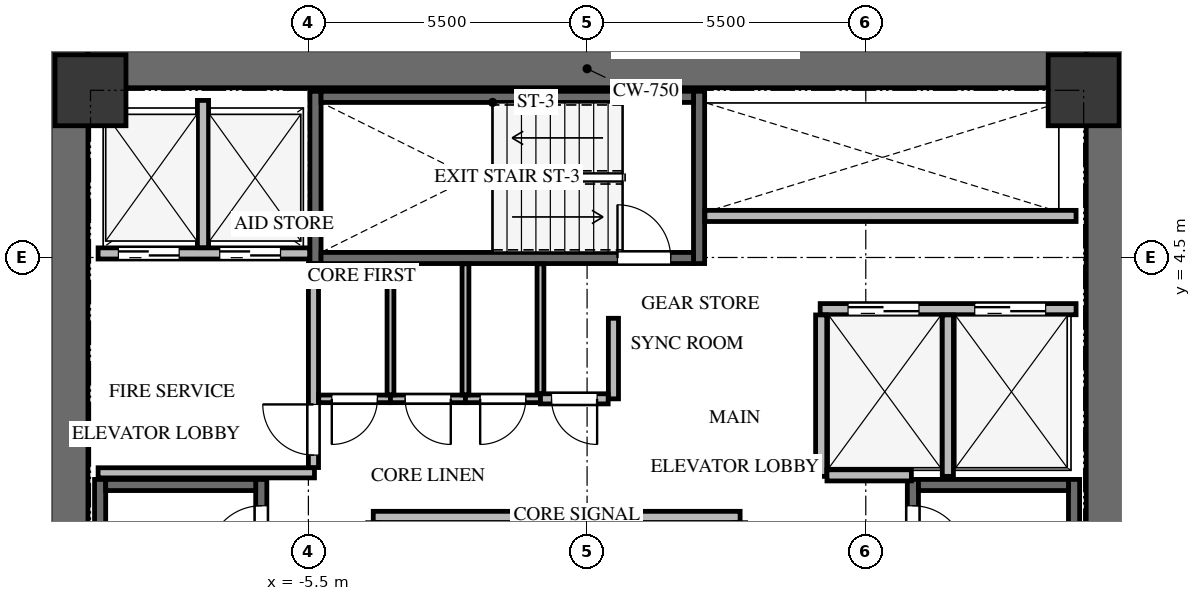
"""IFC4 building model, lengths in metres.
Left out: names, types, materials, properties, quantities, classifications, styles, units other than length and angle.
Written with IfcOpenShell. Run it as: python <this file> out.ifc"""

import sys

from ifc_helpers import new_model, si_unit, direction, frame, frame_2d, origin, origin_2d, place, context, subcontext, project, spatial, rectangle, extrude, source, transform, mapped, element, fill, save


model = new_model("IFC4")
c1 = context("Model", 3, precision=1e-05, world=origin(), true_north=direction((0.0, 1.0)))
c2 = subcontext(c1, "Body", "Model", "MODEL_VIEW")
j1 = project(units=[si_unit("LENGTHUNIT", "METRE"), si_unit("PLANEANGLEUNIT", "RADIAN")], contexts=[c1])
p1 = place(None, origin())
s1 = spatial("IfcSite", under=j1, at=p1, CompositionType="ELEMENT")
p2 = place(p1, origin())
s2 = spatial("IfcBuilding", under=s1, at=p2, CompositionType="ELEMENT")
p3 = place(p2, frame((0.0, 0.0, 97.5)))
s3 = spatial("IfcBuildingStorey", under=s2, at=p3, CompositionType="ELEMENT", Elevation=97.5)
for number, where, z_axis, x_axis in (
    (1, (-10.225, -8.6, 0.0), (0.0, 0.0, 1.0), (0.0, 1.0, 0.0)),
    (2, (10.225, -8.6, 0.0), (0.0, 0.0, 1.0), (0.0, 1.0, 0.0)),
):
    element("IfcWall", number, at=place(p3, frame(where, z_axis=z_axis, x_axis=x_axis)), inside=s3, PredefinedType="SHEAR", context=c2, shape_type="SweptSolid", body=[
        extrude(rectangle(XDim=17.2, YDim=0.75, at=frame_2d((8.6, 0.0))), origin(), (0.0, 0.0, 1.0), 3.3),
    ])
p4 = place(p3, frame((-9.85, 8.225, 0.0), z_axis=(0.0, 0.0, 1.0), x_axis=(1.0, 0.0, 0.0)))
e3 = element("IfcWall", 3, at=p4, inside=s3, PredefinedType="SHEAR", context=c2, shape_type="SweptSolid", body=[
    extrude(rectangle(XDim=19.7, YDim=0.75, at=frame_2d((9.85, 0.0))), origin(), (0.0, 0.0, 1.0), 3.3),
])
p5 = place(p3, frame((-6.43, -7.77, -0.24), z_axis=(0.0, 0.0, 1.0), x_axis=(0.0, 1.0, 0.0)))
e4 = element("IfcWall", 4, at=p5, inside=s3, PredefinedType="SHEAR", context=c2, shape_type="SweptSolid", body=[
    extrude(rectangle(XDim=7.89, YDim=0.22, at=frame_2d((3.945, 0.0))), origin(), (0.0, 0.0, 1.0), 3.3),
])
p6 = place(p5, frame((6.32, 0.0, 0.0)))
e5 = element("IfcOpeningElement", 5, at=p6, cuts=e4, PredefinedType="OPENING", context=c2, shape_type="SweptSolid", body=[
    extrude(rectangle(XDim=1.05, YDim=2.15, at=frame_2d((0.525, 1.075))), frame((0.0, 0.12, 0.0), z_axis=(0.0, -1.0, 0.0), x_axis=(1.0, 0.0, 0.0)), (0.0, 0.0, 1.0), 0.24),
])
p7 = place(p3, frame((-9.61, 0.12, -0.24), z_axis=(0.0, 0.0, 1.0), x_axis=(0.0, -1.0, 0.0)))
e6 = element("IfcWall", 6, at=p7, inside=s3, PredefinedType="SHEAR", context=c2, shape_type="SweptSolid", body=[
    extrude(rectangle(XDim=7.89, YDim=0.22, at=frame_2d((3.945, 0.0))), origin(), (0.0, 0.0, 1.0), 3.3),
])
p8 = place(p3, frame((-6.54, 0.01, -0.24), z_axis=(0.0, 0.0, 1.0), x_axis=(-1.0, 0.0, 0.0)))
e7 = element("IfcWall", 7, at=p8, inside=s3, PredefinedType="SHEAR", context=c2, shape_type="SweptSolid", body=[
    extrude(rectangle(XDim=2.96, YDim=0.22, at=frame_2d((1.48, 0.0))), origin(), (0.0, 0.0, 1.0), 3.3),
])
p9 = place(p3, frame((9.61, -7.77, -0.24), z_axis=(0.0, 0.0, 1.0), x_axis=(0.0, 1.0, 0.0)))
e8 = element("IfcWall", 8, at=p9, inside=s3, PredefinedType="SHEAR", context=c2, shape_type="SweptSolid", body=[
    extrude(rectangle(XDim=7.89, YDim=0.22, at=frame_2d((3.945, 0.0))), origin(), (0.0, 0.0, 1.0), 3.3),
])
p10 = place(p3, frame((6.43, 0.12, -0.24), z_axis=(0.0, 0.0, 1.0), x_axis=(0.0, -1.0, 0.0)))
e9 = element("IfcWall", 9, at=p10, inside=s3, PredefinedType="SHEAR", context=c2, shape_type="SweptSolid", body=[
    extrude(rectangle(XDim=7.89, YDim=0.22, at=frame_2d((3.945, 0.0))), origin(), (0.0, 0.0, 1.0), 3.3),
])
p11 = place(p10, frame((0.52, 0.0, 0.0)))
e10 = element("IfcOpeningElement", 10, at=p11, cuts=e9, PredefinedType="OPENING", context=c2, shape_type="SweptSolid", body=[
    extrude(rectangle(XDim=1.05, YDim=2.15, at=frame_2d((0.525, 1.075))), frame((0.0, 0.12, 0.0), z_axis=(0.0, -1.0, 0.0), x_axis=(1.0, 0.0, 0.0)), (0.0, 0.0, 1.0), 0.24),
])
p12 = place(p3, frame((9.5, 0.01, -0.24), z_axis=(0.0, 0.0, 1.0), x_axis=(-1.0, 0.0, 0.0)))
e11 = element("IfcWall", 11, at=p12, inside=s3, PredefinedType="SHEAR", context=c2, shape_type="SweptSolid", body=[
    extrude(rectangle(XDim=2.96, YDim=0.22, at=frame_2d((1.48, 0.0))), origin(), (0.0, 0.0, 1.0), 3.3),
])
for number, where, z_axis, x_axis in (
    (12, (2.21, 4.38, -0.24), (0.0, 0.0, 1.0), (0.0, 1.0, 0.0)),
    (13, (-5.36, 7.78, -0.24), (0.0, 0.0, 1.0), (0.0, -1.0, 0.0)),
):
    element("IfcWall", number, at=place(p3, frame(where, z_axis=z_axis, x_axis=x_axis)), inside=s3, PredefinedType="SHEAR", context=c2, shape_type="SweptSolid", body=[
        extrude(rectangle(XDim=3.4, YDim=0.22, at=frame_2d((1.7, 0.0))), origin(), (0.0, 0.0, 1.0), 3.3),
    ])
p13 = place(p3, frame((-5.25, 4.49, -0.24), z_axis=(0.0, 0.0, 1.0), x_axis=(1.0, 0.0, 0.0)))
e14 = element("IfcWall", 14, at=p13, inside=s3, PredefinedType="SHEAR", context=c2, shape_type="SweptSolid", body=[
    extrude(rectangle(XDim=7.35, YDim=0.22, at=frame_2d((3.675, 0.0))), origin(), (0.0, 0.0, 1.0), 3.3),
])
p14 = place(p13, frame((5.85, 0.0, 0.0)))
e15 = element("IfcOpeningElement", 15, at=p14, cuts=e14, PredefinedType="OPENING", context=c2, shape_type="SweptSolid", body=[
    extrude(rectangle(XDim=1.05, YDim=2.15, at=frame_2d((0.525, 1.075))), frame((0.0, 0.12, 0.0), z_axis=(0.0, -1.0, 0.0), x_axis=(1.0, 0.0, 0.0)), (0.0, 0.0, 1.0), 0.24),
])
p15 = place(p3, frame((2.1, 7.67, -0.24), z_axis=(0.0, 0.0, 1.0), x_axis=(-1.0, 0.0, 0.0)))
e16 = element("IfcWall", 16, at=p15, inside=s3, PredefinedType="SHEAR", context=c2, shape_type="SweptSolid", body=[
    extrude(rectangle(XDim=7.35, YDim=0.22, at=frame_2d((3.675, 0.0))), origin(), (0.0, 0.0, 1.0), 3.3),
])
m1 = source(origin(), c2, "Body", "SweptSolid", [
    extrude(rectangle(XDim=1.4, YDim=1.4, at=origin_2d()), origin(), (0.0, 0.0, 1.0), 3.3),
])
for number, where, z_axis, x_axis in (
    (17, (9.8, 7.8, -0.24), (0.0, 0.0, 1.0), (1.0, 0.0, 0.0)),
    (18, (-9.8, 7.8, -0.24), (0.0, 0.0, 1.0), (1.0, 0.0, 0.0)),
):
    element("IfcColumn", number, at=place(p3, frame(where, z_axis=z_axis, x_axis=x_axis)), inside=s3, PredefinedType="COLUMN", context=c2, shape_type="MappedRepresentation", body=[
        mapped(m1, transform((0.0, 0.0, 0.0), x_axis=(1.0, 0.0, 0.0), y_axis=(0.0, 1.0, 0.0), z_axis=(0.0, 0.0, 1.0), scale=1.0)),
    ])
p16 = place(p3, frame((-9.65, 4.58, 0.0), z_axis=(0.0, 0.0, 1.0), x_axis=(1.0, 0.0, 0.0)))
e19 = element("IfcWall", 19, at=p16, inside=s3, PredefinedType="SOLIDWALL", context=c2, shape_type="SweptSolid", body=[
    extrude(rectangle(XDim=4.175, YDim=0.22, at=frame_2d((2.087, 0.0))), origin(), (0.0, 0.0, 1.0), 3.045),
])
p17 = place(p16, frame((0.4, 0.0, 0.0)))
e20 = element("IfcOpeningElement", 20, at=p17, cuts=e19, PredefinedType="OPENING", context=c2, shape_type="SweptSolid", body=[
    extrude(rectangle(XDim=1.2, YDim=2.15, at=frame_2d((0.6, 1.075))), frame((0.0, 0.12, 0.0), z_axis=(0.0, -1.0, 0.0), x_axis=(1.0, 0.0, 0.0)), (0.0, 0.0, 1.0), 0.24),
])
p18 = place(p16, frame((2.4, 0.0, 0.0)))
e21 = element("IfcOpeningElement", 21, at=p18, cuts=e19, PredefinedType="OPENING", context=c2, shape_type="SweptSolid", body=[
    extrude(rectangle(XDim=1.2, YDim=2.15, at=frame_2d((0.6, 1.075))), frame((0.0, 0.12, 0.0), z_axis=(0.0, -1.0, 0.0), x_axis=(1.0, 0.0, 0.0)), (0.0, 0.0, 1.0), 0.24),
])
p19 = place(p3, frame((-7.58, 4.694, 0.0), z_axis=(0.0, 0.0, 1.0), x_axis=(0.0, 1.0, 0.0)))
e22 = element("IfcWall", 22, at=p19, inside=s3, PredefinedType="SOLIDWALL", context=c2, shape_type="SweptSolid", body=[
    extrude(rectangle(XDim=2.906, YDim=0.22, at=frame_2d((1.453, 0.0))), origin(), (0.0, 0.0, 1.0), 3.045),
])
p20 = place(p3, frame((-9.65, 0.25, 0.0), z_axis=(0.0, 0.0, 1.0), x_axis=(1.0, 0.0, 0.0)))
e23 = element("IfcWall", 23, at=p20, inside=s3, PredefinedType="SOLIDWALL", context=c2, shape_type="SweptSolid", body=[
    extrude(rectangle(XDim=4.27, YDim=0.2, at=frame_2d((2.135, 0.0))), origin(), (0.0, 0.0, 1.0), 3.045),
])
p21 = place(p3, frame((-5.4, 0.354, 0.0), z_axis=(0.0, 0.0, 1.0), x_axis=(0.0, 1.0, 0.0)))
e24 = element("IfcWall", 24, at=p21, inside=s3, PredefinedType="SOLIDWALL", context=c2, shape_type="SweptSolid", body=[
    extrude(rectangle(XDim=4.026, YDim=0.2, at=frame_2d((2.013, 0.0))), origin(), (0.0, 0.0, 1.0), 3.045),
])
p22 = place(p21, frame((0.246, 0.0, 0.0)))
e25 = element("IfcOpeningElement", 25, at=p22, cuts=e24, PredefinedType="OPENING", context=c2, shape_type="SweptSolid", body=[
    extrude(rectangle(XDim=1.0, YDim=2.15, at=frame_2d((0.5, 1.075))), frame((0.0, 0.11, 0.0), z_axis=(0.0, -1.0, 0.0), x_axis=(1.0, 0.0, 0.0)), (0.0, 0.0, 1.0), 0.22),
])
p23 = place(p3, frame((4.6, 3.48, 0.0), z_axis=(0.0, 0.0, 1.0), x_axis=(1.0, 0.0, 0.0)))
e26 = element("IfcWall", 26, at=p23, inside=s3, PredefinedType="SOLIDWALL", context=c2, shape_type="SweptSolid", body=[
    extrude(rectangle(XDim=5.05, YDim=0.22, at=frame_2d((2.525, 0.0))), origin(), (0.0, 0.0, 1.0), 3.045),
])
p24 = place(p23, frame((0.55, 0.0, 0.0)))
e27 = element("IfcOpeningElement", 27, at=p24, cuts=e26, PredefinedType="OPENING", context=c2, shape_type="SweptSolid", body=[
    extrude(rectangle(XDim=1.4, YDim=2.15, at=frame_2d((0.7, 1.075))), frame((0.0, 0.12, 0.0), z_axis=(0.0, -1.0, 0.0), x_axis=(1.0, 0.0, 0.0)), (0.0, 0.0, 1.0), 0.24),
])
p25 = place(p23, frame((3.05, 0.0, 0.0)))
e28 = element("IfcOpeningElement", 28, at=p25, cuts=e26, PredefinedType="OPENING", context=c2, shape_type="SweptSolid", body=[
    extrude(rectangle(XDim=1.4, YDim=2.15, at=frame_2d((0.7, 1.075))), frame((0.0, 0.12, 0.0), z_axis=(0.0, -1.0, 0.0), x_axis=(1.0, 0.0, 0.0)), (0.0, 0.0, 1.0), 0.24),
])
for number, where, z_axis, x_axis in (
    (29, (4.62, 0.18, 0.0), (0.0, 0.0, 1.0), (0.0, 1.0, 0.0)),
    (30, (7.12, 0.18, 0.0), (0.0, 0.0, 1.0), (0.0, 1.0, 0.0)),
):
    element("IfcWall", number, at=place(p3, frame(where, z_axis=z_axis, x_axis=x_axis)), inside=s3, PredefinedType="SOLIDWALL", context=c2, shape_type="SweptSolid", body=[
        extrude(rectangle(XDim=3.186, YDim=0.22, at=frame_2d((1.593, 0.0))), origin(), (0.0, 0.0, 1.0), 3.045),
    ])
p26 = place(p3, frame((4.734, 0.2, 0.0), z_axis=(0.0, 0.0, 1.0), x_axis=(1.0, 0.0, 0.0)))
e31 = element("IfcWall", 31, at=p26, inside=s3, PredefinedType="SOLIDWALL", context=c2, shape_type="SweptSolid", body=[
    extrude(rectangle(XDim=1.666, YDim=0.22, at=frame_2d((0.833, 0.0))), origin(), (0.0, 0.0, 1.0), 3.045),
])
p27 = place(p3, frame((-4.22, -0.62, 0.0), z_axis=(0.0, 0.0, 1.0), x_axis=(1.0, 0.0, 0.0)))
e32 = element("IfcWall", 32, at=p27, inside=s3, PredefinedType="SOLIDWALL", context=c2, shape_type="SweptSolid", body=[
    extrude(rectangle(XDim=7.24, YDim=0.22, at=frame_2d((3.62, 0.0))), origin(), (0.0, 0.0, 1.0), 3.045),
])
p28 = place(p3, frame((2.325, 5.32, 0.0), z_axis=(0.0, 0.0, 1.0), x_axis=(1.0, 0.0, 0.0)))
e33 = element("IfcWall", 33, at=p28, inside=s3, PredefinedType="SOLIDWALL", context=c2, shape_type="SweptSolid", body=[
    extrude(rectangle(XDim=7.325, YDim=0.22, at=frame_2d((3.663, 0.0))), origin(), (0.0, 0.0, 1.0), 3.045),
])
p29 = place(p3, frame((-3.88, 1.71, 0.0), z_axis=(0.0, 0.0, 1.0), x_axis=(-1.0, 0.0, 0.0)))
e34 = element("IfcWall", 34, at=p29, inside=s3, PredefinedType="PARTITIONING", context=c2, shape_type="SweptSolid", body=[
    extrude(rectangle(XDim=1.416, YDim=0.15, at=frame_2d((0.708, 0.0))), origin(), (0.0, 0.0, 1.0), 3.045),
])
p30 = place(p29, frame((0.258, 0.0, 0.0)))
e35 = element("IfcOpeningElement", 35, at=p30, cuts=e34, PredefinedType="OPENING", context=c2, shape_type="SweptSolid", body=[
    extrude(rectangle(XDim=0.9, YDim=2.05, at=frame_2d((0.45, 1.025))), frame((0.0, 0.085, 0.0), z_axis=(0.0, -1.0, 0.0), x_axis=(1.0, 0.0, 0.0)), (0.0, 0.0, 1.0), 0.17),
])
p31 = place(p3, frame((-2.4, 1.71, 0.0), z_axis=(0.0, 0.0, 1.0), x_axis=(-1.0, 0.0, 0.0)))
e36 = element("IfcWall", 36, at=p31, inside=s3, PredefinedType="PARTITIONING", context=c2, shape_type="SweptSolid", body=[
    extrude(rectangle(XDim=1.48, YDim=0.15, at=frame_2d((0.74, 0.0))), origin(), (0.0, 0.0, 1.0), 3.045),
])
p32 = place(p31, frame((0.29, 0.0, 0.0)))
e37 = element("IfcOpeningElement", 37, at=p32, cuts=e36, PredefinedType="OPENING", context=c2, shape_type="SweptSolid", body=[
    extrude(rectangle(XDim=0.9, YDim=2.05, at=frame_2d((0.45, 1.025))), frame((0.0, 0.085, 0.0), z_axis=(0.0, -1.0, 0.0), x_axis=(1.0, 0.0, 0.0)), (0.0, 0.0, 1.0), 0.17),
])
p33 = place(p3, frame((-0.92, 1.71, 0.0), z_axis=(0.0, 0.0, 1.0), x_axis=(-1.0, 0.0, 0.0)))
e38 = element("IfcWall", 38, at=p33, inside=s3, PredefinedType="PARTITIONING", context=c2, shape_type="SweptSolid", body=[
    extrude(rectangle(XDim=1.48, YDim=0.15, at=frame_2d((0.74, 0.0))), origin(), (0.0, 0.0, 1.0), 3.045),
])
p34 = place(p33, frame((0.29, 0.0, 0.0)))
e39 = element("IfcOpeningElement", 39, at=p34, cuts=e38, PredefinedType="OPENING", context=c2, shape_type="SweptSolid", body=[
    extrude(rectangle(XDim=0.9, YDim=2.05, at=frame_2d((0.45, 1.025))), frame((0.0, 0.085, 0.0), z_axis=(0.0, -1.0, 0.0), x_axis=(1.0, 0.0, 0.0)), (0.0, 0.0, 1.0), 0.17),
])
p35 = place(p3, frame((0.52, 3.3, 0.0), z_axis=(0.0, 0.0, 1.0), x_axis=(0.0, -1.0, 0.0)))
e40 = element("IfcWall", 40, at=p35, inside=s3, PredefinedType="SOLIDWALL", context=c2, shape_type="SweptSolid", body=[
    extrude(rectangle(XDim=1.59, YDim=0.2, at=frame_2d((0.795, 0.0))), origin(), (0.0, 0.0, 1.0), 3.045),
])
p36 = place(p3, frame((0.416, 1.71, 0.0), z_axis=(0.0, 0.0, 1.0), x_axis=(-1.0, 0.0, 0.0)))
e41 = element("IfcWall", 41, at=p36, inside=s3, PredefinedType="SOLIDWALL", context=c2, shape_type="SweptSolid", body=[
    extrude(rectangle(XDim=1.336, YDim=0.2, at=frame_2d((0.668, 0.0))), origin(), (0.0, 0.0, 1.0), 3.045),
])
p37 = place(p36, frame((0.218, 0.0, 0.0)))
e42 = element("IfcOpeningElement", 42, at=p37, cuts=e41, PredefinedType="OPENING", context=c2, shape_type="SweptSolid", body=[
    extrude(rectangle(XDim=0.9, YDim=2.05, at=frame_2d((0.45, 1.025))), frame((0.0, 0.11, 0.0), z_axis=(0.0, -1.0, 0.0), x_axis=(1.0, 0.0, 0.0)), (0.0, 0.0, 1.0), 0.22),
])
for number, where, z_axis, x_axis in (
    (43, (-3.88, 4.375, 0.0), (0.0, 0.0, 1.0), (0.0, -1.0, 0.0)),
    (44, (-2.4, 4.375, 0.0), (0.0, 0.0, 1.0), (0.0, -1.0, 0.0)),
):
    element("IfcWall", number, at=place(p3, frame(where, z_axis=z_axis, x_axis=x_axis)), inside=s3, PredefinedType="PARTITIONING", context=c2, shape_type="SweptSolid", body=[
        extrude(rectangle(XDim=2.586, YDim=0.135, at=frame_2d((1.293, 0.0))), origin(), (0.0, 0.0, 1.0), 3.045),
    ])
p38 = place(p3, frame((-0.92, 4.375, 0.0), z_axis=(0.0, 0.0, 1.0), x_axis=(0.0, -1.0, 0.0)))
e45 = element("IfcWall", 45, at=p38, inside=s3, PredefinedType="PARTITIONING", context=c2, shape_type="SweptSolid", body=[
    extrude(rectangle(XDim=2.561, YDim=0.135, at=frame_2d((1.281, 0.0))), origin(), (0.0, 0.0, 1.0), 3.045),
])
m2 = source(origin(), c2, "Body", "SweptSolid", [
    extrude(rectangle(XDim=1.05, YDim=2.15, at=frame_2d((0.525, 1.075))), frame((0.0, 0.025, 0.0), z_axis=(0.0, -1.0, 0.0), x_axis=(1.0, 0.0, 0.0)), (0.0, 0.0, 1.0), 0.05),
])
p39 = place(p6, origin())
e46 = element("IfcDoor", 46, at=p39, inside=s3, OperationType="SINGLE_SWING_LEFT", PredefinedType="DOOR", context=c2, shape_type="MappedRepresentation", body=[
    mapped(m2, transform((0.0, 0.0, 0.0), x_axis=(1.0, 0.0, 0.0), y_axis=(0.0, 1.0, 0.0), z_axis=(0.0, 0.0, 1.0), scale=1.0)),
])
fill(e5, e46)
m3 = source(origin(), c2, "Body", "SweptSolid", [
    extrude(rectangle(XDim=1.05, YDim=2.15, at=frame_2d((0.525, 1.075))), frame((0.0, 0.025, 0.0), z_axis=(0.0, -1.0, 0.0), x_axis=(1.0, 0.0, 0.0)), (0.0, 0.0, 1.0), 0.05),
])
p40 = place(p11, origin())
e47 = element("IfcDoor", 47, at=p40, inside=s3, OperationType="SINGLE_SWING_RIGHT", PredefinedType="DOOR", context=c2, shape_type="MappedRepresentation", body=[
    mapped(m3, transform((0.0, 0.0, 0.0), x_axis=(1.0, 0.0, 0.0), y_axis=(0.0, 1.0, 0.0), z_axis=(0.0, 0.0, 1.0), scale=1.0)),
])
fill(e10, e47)
p41 = place(p14, origin())
e48 = element("IfcDoor", 48, at=p41, inside=s3, OperationType="SINGLE_SWING_LEFT", PredefinedType="DOOR", context=c2, shape_type="MappedRepresentation", body=[
    mapped(m2, transform((0.0, 0.0, 0.0), x_axis=(1.0, 0.0, 0.0), y_axis=(0.0, 1.0, 0.0), z_axis=(0.0, 0.0, 1.0), scale=1.0)),
])
fill(e15, e48)
m4 = source(origin(), c2, "Body", "SweptSolid", [
    extrude(rectangle(XDim=1.2, YDim=2.15, at=frame_2d((0.6, 1.075))), frame((0.0, 0.025, 0.0), z_axis=(0.0, -1.0, 0.0), x_axis=(1.0, 0.0, 0.0)), (0.0, 0.0, 1.0), 0.05),
])
p42 = place(p17, origin())
e49 = element("IfcDoor", 49, at=p42, inside=s3, OperationType="DOUBLE_DOOR_SLIDING", PredefinedType="DOOR", context=c2, shape_type="MappedRepresentation", body=[
    mapped(m4, transform((0.0, 0.0, 0.0), x_axis=(1.0, 0.0, 0.0), y_axis=(0.0, 1.0, 0.0), z_axis=(0.0, 0.0, 1.0), scale=1.0)),
])
fill(e20, e49)
p43 = place(p18, origin())
e50 = element("IfcDoor", 50, at=p43, inside=s3, OperationType="DOUBLE_DOOR_SLIDING", PredefinedType="DOOR", context=c2, shape_type="MappedRepresentation", body=[
    mapped(m4, transform((0.0, 0.0, 0.0), x_axis=(1.0, 0.0, 0.0), y_axis=(0.0, 1.0, 0.0), z_axis=(0.0, 0.0, 1.0), scale=1.0)),
])
fill(e21, e50)
m5 = source(origin(), c2, "Body", "SweptSolid", [
    extrude(rectangle(XDim=1.0, YDim=2.15, at=frame_2d((0.5, 1.075))), frame((0.0, 0.025, 0.0), z_axis=(0.0, -1.0, 0.0), x_axis=(1.0, 0.0, 0.0)), (0.0, 0.0, 1.0), 0.05),
])
p44 = place(p22, origin())
e51 = element("IfcDoor", 51, at=p44, inside=s3, OperationType="SINGLE_SWING_RIGHT", PredefinedType="DOOR", context=c2, shape_type="MappedRepresentation", body=[
    mapped(m5, transform((0.0, 0.0, 0.0), x_axis=(1.0, 0.0, 0.0), y_axis=(0.0, 1.0, 0.0), z_axis=(0.0, 0.0, 1.0), scale=1.0)),
])
fill(e25, e51)
m6 = source(origin(), c2, "Body", "SweptSolid", [
    extrude(rectangle(XDim=1.4, YDim=2.15, at=frame_2d((0.7, 1.075))), frame((0.0, 0.025, 0.0), z_axis=(0.0, -1.0, 0.0), x_axis=(1.0, 0.0, 0.0)), (0.0, 0.0, 1.0), 0.05),
])
p45 = place(p24, origin())
e52 = element("IfcDoor", 52, at=p45, inside=s3, OperationType="DOUBLE_DOOR_SLIDING", PredefinedType="DOOR", context=c2, shape_type="MappedRepresentation", body=[
    mapped(m6, transform((0.0, 0.0, 0.0), x_axis=(1.0, 0.0, 0.0), y_axis=(0.0, 1.0, 0.0), z_axis=(0.0, 0.0, 1.0), scale=1.0)),
])
fill(e27, e52)
p46 = place(p25, origin())
e53 = element("IfcDoor", 53, at=p46, inside=s3, OperationType="DOUBLE_DOOR_SLIDING", PredefinedType="DOOR", context=c2, shape_type="MappedRepresentation", body=[
    mapped(m6, transform((0.0, 0.0, 0.0), x_axis=(1.0, 0.0, 0.0), y_axis=(0.0, 1.0, 0.0), z_axis=(0.0, 0.0, 1.0), scale=1.0)),
])
fill(e28, e53)
m7 = source(origin(), c2, "Body", "SweptSolid", [
    extrude(rectangle(XDim=0.9, YDim=2.05, at=frame_2d((0.45, 1.025))), frame((0.0, 0.025, 0.0), z_axis=(0.0, -1.0, 0.0), x_axis=(1.0, 0.0, 0.0)), (0.0, 0.0, 1.0), 0.05),
])
p47 = place(p30, origin())
e54 = element("IfcDoor", 54, at=p47, inside=s3, OperationType="SINGLE_SWING_RIGHT", PredefinedType="DOOR", context=c2, shape_type="MappedRepresentation", body=[
    mapped(m7, transform((0.0, 0.0, 0.0), x_axis=(1.0, 0.0, 0.0), y_axis=(0.0, 1.0, 0.0), z_axis=(0.0, 0.0, 1.0), scale=1.0)),
])
fill(e35, e54)
m8 = source(origin(), c2, "Body", "SweptSolid", [
    extrude(rectangle(XDim=0.9, YDim=2.05, at=frame_2d((0.45, 1.025))), frame((0.0, 0.025, 0.0), z_axis=(0.0, -1.0, 0.0), x_axis=(1.0, 0.0, 0.0)), (0.0, 0.0, 1.0), 0.05),
])
p48 = place(p32, origin())
e55 = element("IfcDoor", 55, at=p48, inside=s3, OperationType="SINGLE_SWING_LEFT", PredefinedType="DOOR", context=c2, shape_type="MappedRepresentation", body=[
    mapped(m8, transform((0.0, 0.0, 0.0), x_axis=(1.0, 0.0, 0.0), y_axis=(0.0, 1.0, 0.0), z_axis=(0.0, 0.0, 1.0), scale=1.0)),
])
fill(e37, e55)
p49 = place(p34, origin())
e56 = element("IfcDoor", 56, at=p49, inside=s3, OperationType="SINGLE_SWING_RIGHT", PredefinedType="DOOR", context=c2, shape_type="MappedRepresentation", body=[
    mapped(m7, transform((0.0, 0.0, 0.0), x_axis=(1.0, 0.0, 0.0), y_axis=(0.0, 1.0, 0.0), z_axis=(0.0, 0.0, 1.0), scale=1.0)),
])
fill(e39, e56)
p50 = place(p37, origin())
e57 = element("IfcDoor", 57, at=p50, inside=s3, OperationType="SINGLE_SWING_LEFT", PredefinedType="DOOR", context=c2, shape_type="MappedRepresentation", body=[
    mapped(m8, transform((0.0, 0.0, 0.0), x_axis=(1.0, 0.0, 0.0), y_axis=(0.0, 1.0, 0.0), z_axis=(0.0, 0.0, 1.0), scale=1.0)),
])
fill(e42, e57)
save(model, sys.argv[1])
